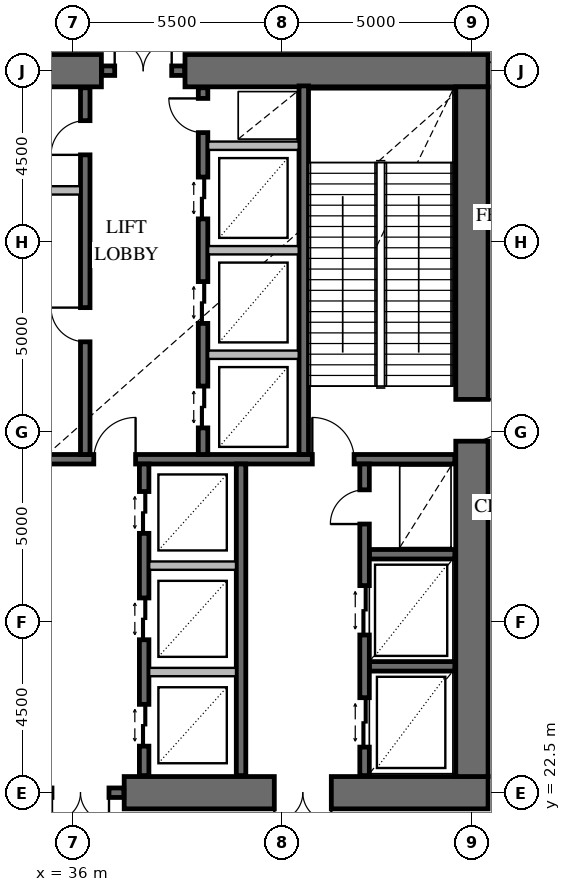
"""IFC4 building model, lengths in metres.
Left out: names, types, materials, properties, quantities, classifications, styles, units other than length and angle.
Written with IfcOpenShell. Run it as: python <this file> out.ifc"""

import sys

from ifc_helpers import new_model, si_unit, direction, frame, frame_2d, origin, place, context, subcontext, project, spatial, rectangle, extrude, element, fill, save


model = new_model("IFC4")
c1 = context("Model", 3, precision=1e-05, world=origin(), true_north=direction((0.0, 1.0)))
c2 = subcontext(c1, "Body", "Model", "MODEL_VIEW")
j1 = project(units=[si_unit("LENGTHUNIT", "METRE"), si_unit("PLANEANGLEUNIT", "RADIAN")], contexts=[c1])
p1 = place(None, origin())
s1 = spatial("IfcSite", under=j1, at=p1, CompositionType="ELEMENT")
p2 = place(p1, origin())
s2 = spatial("IfcBuilding", under=s1, at=p2, CompositionType="ELEMENT")
p3 = place(p2, origin())
s3 = spatial("IfcBuildingStorey", under=s2, at=p3, CompositionType="ELEMENT", Elevation=0.0)
p4 = place(p3, frame((37.35, 22.5, 0.0), z_axis=(0.0, 0.0, 1.0), x_axis=(1.0, 0.0, 0.0)))
e1 = element("IfcWall", 1, at=p4, inside=s3, PredefinedType="SHEAR", context=c2, shape_type="SweptSolid", body=[
    extrude(rectangle(XDim=9.575, YDim=0.85, at=frame_2d((4.788, 0.0))), origin(), (0.0, 0.0, 1.0), 7.8),
])
p5 = place(p4, frame((3.95, 0.0, 0.0)))
e2 = element("IfcOpeningElement", 2, at=p5, cuts=e1, PredefinedType="OPENING", context=c2, shape_type="SweptSolid", body=[
    extrude(rectangle(XDim=1.5, YDim=2.15, at=frame_2d((0.75, 1.075))), frame((0.0, 0.437, 0.0), z_axis=(0.0, -1.0, 0.0), x_axis=(1.0, 0.0, 0.0)), (0.0, 0.0, 1.0), 0.874),
])
p6 = place(p3, frame((46.925, 41.5, 0.0), z_axis=(0.0, 0.0, 1.0), x_axis=(-1.0, 0.0, 0.0)))
e3 = element("IfcWall", 3, at=p6, inside=s3, PredefinedType="SHEAR", context=c2, shape_type="SweptSolid", body=[
    extrude(rectangle(XDim=7.975, YDim=0.85, at=frame_2d((3.988, 0.0))), origin(), (0.0, 0.0, 1.0), 7.8),
])
p7 = place(p3, frame((36.75, 41.5, 0.0), z_axis=(0.0, 0.0, 1.0), x_axis=(-1.0, 0.0, 0.0)))
e4 = element("IfcWall", 4, at=p7, inside=s3, PredefinedType="SHEAR", context=c2, shape_type="SweptSolid", body=[
    extrude(rectangle(XDim=11.675, YDim=0.85, at=frame_2d((5.837, 0.0))), origin(), (0.0, 0.0, 1.0), 7.8),
])
p8 = place(p7, frame((4.25, 0.0, 0.0)))
e5 = element("IfcOpeningElement", 5, at=p8, cuts=e4, PredefinedType="OPENING", context=c2, shape_type="SweptSolid", body=[
    extrude(rectangle(XDim=1.1, YDim=2.15, at=frame_2d((0.55, 1.075))), frame((0.0, 0.437, 0.0), z_axis=(0.0, -1.0, 0.0), x_axis=(1.0, 0.0, 0.0)), (0.0, 0.0, 1.0), 0.874),
])
p9 = place(p3, frame((46.5, 22.925, 0.0), z_axis=(0.0, 0.0, 1.0), x_axis=(0.0, 1.0, 0.0)))
e6 = element("IfcWall", 6, at=p9, inside=s3, PredefinedType="SHEAR", context=c2, shape_type="SweptSolid", body=[
    extrude(rectangle(XDim=18.15, YDim=0.85, at=frame_2d((9.075, 0.0))), origin(), (0.0, 0.0, 1.0), 7.8),
])
p10 = place(p9, frame((8.825, 0.0, 0.0)))
e7 = element("IfcOpeningElement", 7, at=p10, cuts=e6, PredefinedType="OPENING", context=c2, shape_type="SweptSolid", body=[
    extrude(rectangle(XDim=1.1, YDim=2.15, at=frame_2d((0.55, 1.075))), frame((0.0, 0.437, 0.0), z_axis=(0.0, -1.0, 0.0), x_axis=(1.0, 0.0, 0.0)), (0.0, 0.0, 1.0), 0.874),
])
p11 = place(p3, frame((54.398, 30.911, 0.0), z_axis=(0.0, 0.0, 1.0), x_axis=(-0.49999847728, -0.866026282926, 0.0)))
e8 = element("IfcWall", 8, at=p11, inside=s3, PredefinedType="SOLIDWALL", context=c2, shape_type="SweptSolid", body=[
    extrude(rectangle(XDim=16.512, YDim=0.3, at=frame_2d((8.256, 0.0))), origin(), (0.0, 0.0, 1.0), 5.95),
])
p12 = place(p11, frame((7.356, 0.0, 0.0)))
e9 = element("IfcOpeningElement", 9, at=p12, cuts=e8, PredefinedType="OPENING", context=c2, shape_type="SweptSolid", body=[
    extrude(rectangle(XDim=1.8, YDim=2.4, at=frame_2d((0.9, 1.2))), frame((0.0, 0.162, 0.0), z_axis=(0.0, -1.0, 0.0), x_axis=(1.0, 0.0, 0.0)), (0.0, 0.0, 1.0), 0.324),
])
p13 = place(p11, frame((7.056, 0.0, 4.5)))
e10 = element("IfcOpeningElement", 10, at=p13, cuts=e8, PredefinedType="OPENING", context=c2, shape_type="SweptSolid", body=[
    extrude(rectangle(XDim=2.4, YDim=1.6, at=frame_2d((1.2, 0.8))), frame((0.0, 0.162, 0.0), z_axis=(0.0, -1.0, 0.0), x_axis=(1.0, 0.0, 0.0)), (0.0, 0.0, 1.0), 0.324),
])
p14 = place(p3, frame((46.142, 47.389, 0.0), z_axis=(0.0, 0.0, 1.0), x_axis=(0.49999847728, -0.866026282926, 0.0)))
e11 = element("IfcWall", 11, at=p14, inside=s3, PredefinedType="SOLIDWALL", context=c2, shape_type="SweptSolid", body=[
    extrude(rectangle(XDim=16.512, YDim=0.3, at=frame_2d((8.256, 0.0))), origin(), (0.0, 0.0, 1.0), 5.95),
])
p15 = place(p14, frame((8.606, 0.0, 0.0)))
e12 = element("IfcOpeningElement", 12, at=p15, cuts=e11, PredefinedType="OPENING", context=c2, shape_type="SweptSolid", body=[
    extrude(rectangle(XDim=2.0, YDim=2.5, at=frame_2d((1.0, 1.25))), frame((0.0, 0.162, 0.0), z_axis=(0.0, -1.0, 0.0), x_axis=(1.0, 0.0, 0.0)), (0.0, 0.0, 1.0), 0.324),
])
p16 = place(p14, frame((7.056, 0.0, 4.5)))
e13 = element("IfcOpeningElement", 13, at=p16, cuts=e11, PredefinedType="OPENING", context=c2, shape_type="SweptSolid", body=[
    extrude(rectangle(XDim=2.4, YDim=1.6, at=frame_2d((1.2, 0.8))), frame((0.0, 0.162, 0.0), z_axis=(0.0, -1.0, 0.0), x_axis=(1.0, 0.0, 0.0)), (0.0, 0.0, 1.0), 0.324),
])
p17 = place(p3, frame((35.06, 22.5, 0.0), z_axis=(0.0, 0.0, 1.0), x_axis=(1.0, 0.0, 0.0)))
e14 = element("IfcWall", 14, at=p17, inside=s3, PredefinedType="SOLIDWALL", context=c2, shape_type="SweptSolid", body=[
    extrude(rectangle(XDim=2.28, YDim=0.25, at=frame_2d((1.14, 0.0))), origin(), (0.0, 0.0, 1.0), 7.8),
])
p18 = place(p17, frame((0.39, 0.0, 0.0)))
e15 = element("IfcOpeningElement", 15, at=p18, cuts=e14, PredefinedType="OPENING", context=c2, shape_type="SweptSolid", body=[
    extrude(rectangle(XDim=1.5, YDim=2.15, at=frame_2d((0.75, 1.075))), frame((0.0, 0.137, 0.0), z_axis=(0.0, -1.0, 0.0), x_axis=(1.0, 0.0, 0.0)), (0.0, 0.0, 1.0), 0.274),
])
p19 = place(p3, frame((36.76, 41.5, 0.0), z_axis=(0.0, 0.0, 1.0), x_axis=(1.0, 0.0, 0.0)))
e16 = element("IfcWall", 16, at=p19, inside=s3, PredefinedType="SOLIDWALL", context=c2, shape_type="SweptSolid", body=[
    extrude(rectangle(XDim=2.18, YDim=0.25, at=frame_2d((1.09, 0.0))), origin(), (0.0, 0.0, 1.0), 7.8),
])
p20 = place(p19, frame((0.34, 0.0, 0.0)))
e17 = element("IfcOpeningElement", 17, at=p20, cuts=e16, PredefinedType="OPENING", context=c2, shape_type="SweptSolid", body=[
    extrude(rectangle(XDim=1.5, YDim=2.15, at=frame_2d((0.75, 1.075))), frame((0.0, 0.137, 0.0), z_axis=(0.0, -1.0, 0.0), x_axis=(1.0, 0.0, 0.0)), (0.0, 0.0, 1.0), 0.274),
])
p21 = place(p3, frame((25.95, 31.275, 0.0), z_axis=(0.0, 0.0, 1.0), x_axis=(1.0, 0.0, 0.0)))
e18 = element("IfcWall", 18, at=p21, inside=s3, PredefinedType="SOLIDWALL", context=c2, shape_type="SweptSolid", body=[
    extrude(rectangle(XDim=20.1, YDim=0.25, at=frame_2d((10.05, 0.0))), origin(), (0.0, 0.0, 1.0), 7.8),
])
p22 = place(p21, frame((2.6, 0.0, 0.0)))
e19 = element("IfcOpeningElement", 19, at=p22, cuts=e18, PredefinedType="OPENING", context=c2, shape_type="SweptSolid", body=[
    extrude(rectangle(XDim=1.1, YDim=2.15, at=frame_2d((0.55, 1.075))), frame((0.0, 0.137, 0.0), z_axis=(0.0, -1.0, 0.0), x_axis=(1.0, 0.0, 0.0)), (0.0, 0.0, 1.0), 0.274),
])
p23 = place(p21, frame((10.6, 0.0, 0.0)))
e20 = element("IfcOpeningElement", 20, at=p23, cuts=e18, PredefinedType="OPENING", context=c2, shape_type="SweptSolid", body=[
    extrude(rectangle(XDim=1.1, YDim=2.15, at=frame_2d((0.55, 1.075))), frame((0.0, 0.137, 0.0), z_axis=(0.0, -1.0, 0.0), x_axis=(1.0, 0.0, 0.0)), (0.0, 0.0, 1.0), 0.274),
])
p24 = place(p21, frame((16.35, 0.0, 0.0)))
e21 = element("IfcOpeningElement", 21, at=p24, cuts=e18, PredefinedType="OPENING", context=c2, shape_type="SweptSolid", body=[
    extrude(rectangle(XDim=1.1, YDim=2.15, at=frame_2d((0.55, 1.075))), frame((0.0, 0.137, 0.0), z_axis=(0.0, -1.0, 0.0), x_axis=(1.0, 0.0, 0.0)), (0.0, 0.0, 1.0), 0.274),
])
p25 = place(p3, frame((42.075, 31.4, 0.0), z_axis=(0.0, 0.0, 1.0), x_axis=(0.0, 1.0, 0.0)))
e22 = element("IfcWall", 22, at=p25, inside=s3, PredefinedType="SOLIDWALL", context=c2, shape_type="SweptSolid", body=[
    extrude(rectangle(XDim=9.7, YDim=0.25, at=frame_2d((4.85, 0.0))), origin(), (0.0, 0.0, 1.0), 7.8),
])
p26 = place(p3, frame((36.325, 31.4, 0.0), z_axis=(0.0, 0.0, 1.0), x_axis=(0.0, 1.0, 0.0)))
e23 = element("IfcWall", 23, at=p26, inside=s3, PredefinedType="SOLIDWALL", context=c2, shape_type="SweptSolid", body=[
    extrude(rectangle(XDim=9.65, YDim=0.25, at=frame_2d((4.825, 0.0))), origin(), (0.0, 0.0, 1.0), 7.8),
])
p27 = place(p26, frame((2.965, 0.0, 0.0)))
e24 = element("IfcOpeningElement", 24, at=p27, cuts=e23, PredefinedType="OPENING", context=c2, shape_type="SweptSolid", body=[
    extrude(rectangle(XDim=0.9, YDim=2.1, at=frame_2d((0.45, 1.05))), frame((0.0, 0.137, 0.0), z_axis=(0.0, -1.0, 0.0), x_axis=(1.0, 0.0, 0.0)), (0.0, 0.0, 1.0), 0.274),
])
p28 = place(p26, frame((7.885, 0.0, 0.0)))
e25 = element("IfcOpeningElement", 25, at=p28, cuts=e23, PredefinedType="OPENING", context=c2, shape_type="SweptSolid", body=[
    extrude(rectangle(XDim=0.9, YDim=2.1, at=frame_2d((0.45, 1.05))), frame((0.0, 0.137, 0.0), z_axis=(0.0, -1.0, 0.0), x_axis=(1.0, 0.0, 0.0)), (0.0, 0.0, 1.0), 0.274),
])
p29 = place(p3, frame((39.425, 31.4, 0.0), z_axis=(0.0, 0.0, 1.0), x_axis=(0.0, 1.0, 0.0)))
e26 = element("IfcWall", 26, at=p29, inside=s3, PredefinedType="SOLIDWALL", context=c2, shape_type="SweptSolid", body=[
    extrude(rectangle(XDim=9.65, YDim=0.25, at=frame_2d((4.825, 0.0))), origin(), (0.0, 0.0, 1.0), 7.8),
])
p30 = place(p29, frame((0.7, 0.0, 0.0)))
e27 = element("IfcOpeningElement", 27, at=p30, cuts=e26, PredefinedType="OPENING", context=c2, shape_type="SweptSolid", body=[
    extrude(rectangle(XDim=1.1, YDim=2.2, at=frame_2d((0.55, 1.1))), frame((0.0, 0.137, 0.0), z_axis=(0.0, -1.0, 0.0), x_axis=(1.0, 0.0, 0.0)), (0.0, 0.0, 1.0), 0.274),
])
p31 = place(p29, frame((3.45, 0.0, 0.0)))
e28 = element("IfcOpeningElement", 28, at=p31, cuts=e26, PredefinedType="OPENING", context=c2, shape_type="SweptSolid", body=[
    extrude(rectangle(XDim=1.1, YDim=2.2, at=frame_2d((0.55, 1.1))), frame((0.0, 0.137, 0.0), z_axis=(0.0, -1.0, 0.0), x_axis=(1.0, 0.0, 0.0)), (0.0, 0.0, 1.0), 0.274),
])
p32 = place(p29, frame((6.2, 0.0, 0.0)))
e29 = element("IfcOpeningElement", 29, at=p32, cuts=e26, PredefinedType="OPENING", context=c2, shape_type="SweptSolid", body=[
    extrude(rectangle(XDim=1.1, YDim=2.2, at=frame_2d((0.55, 1.1))), frame((0.0, 0.137, 0.0), z_axis=(0.0, -1.0, 0.0), x_axis=(1.0, 0.0, 0.0)), (0.0, 0.0, 1.0), 0.274),
])
p33 = place(p29, frame((8.47, 0.0, 0.0)))
e30 = element("IfcOpeningElement", 30, at=p33, cuts=e26, PredefinedType="OPENING", context=c2, shape_type="SweptSolid", body=[
    extrude(rectangle(XDim=0.9, YDim=2.1, at=frame_2d((0.45, 1.05))), frame((0.0, 0.137, 0.0), z_axis=(0.0, -1.0, 0.0), x_axis=(1.0, 0.0, 0.0)), (0.0, 0.0, 1.0), 0.274),
])
p34 = place(p3, frame((37.875, 22.95, 0.0), z_axis=(0.0, 0.0, 1.0), x_axis=(0.0, 1.0, 0.0)))
e31 = element("IfcWall", 31, at=p34, inside=s3, PredefinedType="SOLIDWALL", context=c2, shape_type="SweptSolid", body=[
    extrude(rectangle(XDim=8.2, YDim=0.25, at=frame_2d((4.1, 0.0))), origin(), (0.0, 0.0, 1.0), 7.8),
])
p35 = place(p34, frame((0.775, 0.0, 0.0)))
e32 = element("IfcOpeningElement", 32, at=p35, cuts=e31, PredefinedType="OPENING", context=c2, shape_type="SweptSolid", body=[
    extrude(rectangle(XDim=1.1, YDim=2.2, at=frame_2d((0.55, 1.1))), frame((0.0, 0.137, 0.0), z_axis=(0.0, -1.0, 0.0), x_axis=(1.0, 0.0, 0.0)), (0.0, 0.0, 1.0), 0.274),
])
p36 = place(p34, frame((3.575, 0.0, 0.0)))
e33 = element("IfcOpeningElement", 33, at=p36, cuts=e31, PredefinedType="OPENING", context=c2, shape_type="SweptSolid", body=[
    extrude(rectangle(XDim=1.1, YDim=2.2, at=frame_2d((0.55, 1.1))), frame((0.0, 0.137, 0.0), z_axis=(0.0, -1.0, 0.0), x_axis=(1.0, 0.0, 0.0)), (0.0, 0.0, 1.0), 0.274),
])
p37 = place(p34, frame((6.375, 0.0, 0.0)))
e34 = element("IfcOpeningElement", 34, at=p37, cuts=e31, PredefinedType="OPENING", context=c2, shape_type="SweptSolid", body=[
    extrude(rectangle(XDim=1.1, YDim=2.2, at=frame_2d((0.55, 1.1))), frame((0.0, 0.137, 0.0), z_axis=(0.0, -1.0, 0.0), x_axis=(1.0, 0.0, 0.0)), (0.0, 0.0, 1.0), 0.274),
])
p38 = place(p3, frame((40.425, 22.95, 0.0), z_axis=(0.0, 0.0, 1.0), x_axis=(0.0, 1.0, 0.0)))
e35 = element("IfcWall", 35, at=p38, inside=s3, PredefinedType="SOLIDWALL", context=c2, shape_type="SweptSolid", body=[
    extrude(rectangle(XDim=8.2, YDim=0.25, at=frame_2d((4.1, 0.0))), origin(), (0.0, 0.0, 1.0), 7.8),
])
for number, where, z_axis, x_axis in (
    (36, (43.8, 25.825, 0.0), (0.0, 0.0, 1.0), (1.0, 0.0, 0.0)),
    (37, (43.8, 28.775, 0.0), (0.0, 0.0, 1.0), (1.0, 0.0, 0.0)),
):
    element("IfcWall", number, at=place(p3, frame(where, z_axis=z_axis, x_axis=x_axis)), inside=s3, PredefinedType="SOLIDWALL", context=c2, shape_type="SweptSolid", body=[
        extrude(rectangle(XDim=2.25, YDim=0.25, at=frame_2d((1.125, 0.0))), origin(), (0.0, 0.0, 1.0), 7.8),
    ])
p39 = place(p3, frame((43.675, 22.95, 0.0), z_axis=(0.0, 0.0, 1.0), x_axis=(0.0, 1.0, 0.0)))
e38 = element("IfcWall", 38, at=p39, inside=s3, PredefinedType="SOLIDWALL", context=c2, shape_type="SweptSolid", body=[
    extrude(rectangle(XDim=8.2, YDim=0.25, at=frame_2d((4.1, 0.0))), origin(), (0.0, 0.0, 1.0), 7.8),
])
p40 = place(p39, frame((0.75, 0.0, 0.0)))
e39 = element("IfcOpeningElement", 39, at=p40, cuts=e38, PredefinedType="OPENING", context=c2, shape_type="SweptSolid", body=[
    extrude(rectangle(XDim=1.3, YDim=2.3, at=frame_2d((0.65, 1.15))), frame((0.0, 0.137, 0.0), z_axis=(0.0, -1.0, 0.0), x_axis=(1.0, 0.0, 0.0)), (0.0, 0.0, 1.0), 0.274),
])
p41 = place(p39, frame((3.7, 0.0, 0.0)))
e40 = element("IfcOpeningElement", 40, at=p41, cuts=e38, PredefinedType="OPENING", context=c2, shape_type="SweptSolid", body=[
    extrude(rectangle(XDim=1.3, YDim=2.3, at=frame_2d((0.65, 1.15))), frame((0.0, 0.137, 0.0), z_axis=(0.0, -1.0, 0.0), x_axis=(1.0, 0.0, 0.0)), (0.0, 0.0, 1.0), 0.274),
])
p42 = place(p39, frame((6.62, 0.0, 0.0)))
e41 = element("IfcOpeningElement", 41, at=p42, cuts=e38, PredefinedType="OPENING", context=c2, shape_type="SweptSolid", body=[
    extrude(rectangle(XDim=0.9, YDim=2.1, at=frame_2d((0.45, 1.05))), frame((0.0, 0.137, 0.0), z_axis=(0.0, -1.0, 0.0), x_axis=(1.0, 0.0, 0.0)), (0.0, 0.0, 1.0), 0.274),
])
p43 = place(p3, frame((34.108, 38.35, 0.0), z_axis=(0.0, 0.0, 1.0), x_axis=(1.0, 0.0, 0.0)))
e42 = element("IfcWall", 42, at=p43, inside=s3, PredefinedType="PARTITIONING", context=c2, shape_type="SweptSolid", body=[
    extrude(rectangle(XDim=2.084, YDim=0.22, at=frame_2d((1.042, 0.0))), origin(), (0.0, 0.0, 1.0), 7.35),
])
for number, where, z_axis, x_axis in (
    (43, (39.558, 34.025, 0.0), (0.0, 0.0, 1.0), (1.0, 0.0, 0.0)),
    (44, (39.558, 36.775, 0.0), (0.0, 0.0, 1.0), (1.0, 0.0, 0.0)),
    (45, (39.558, 39.525, 0.0), (0.0, 0.0, 1.0), (1.0, 0.0, 0.0)),
):
    element("IfcWall", number, at=place(p3, frame(where, z_axis=z_axis, x_axis=x_axis)), inside=s3, PredefinedType="PARTITIONING", context=c2, shape_type="SweptSolid", body=[
        extrude(rectangle(XDim=2.384, YDim=0.22, at=frame_2d((1.192, 0.0))), origin(), (0.0, 0.0, 1.0), 7.35),
    ])
for number, where, z_axis, x_axis in (
    (46, (38.008, 25.675, 0.0), (0.0, 0.0, 1.0), (1.0, 0.0, 0.0)),
    (47, (38.008, 28.475, 0.0), (0.0, 0.0, 1.0), (1.0, 0.0, 0.0)),
):
    element("IfcWall", number, at=place(p3, frame(where, z_axis=z_axis, x_axis=x_axis)), inside=s3, PredefinedType="PARTITIONING", context=c2, shape_type="SweptSolid", body=[
        extrude(rectangle(XDim=2.284, YDim=0.22, at=frame_2d((1.142, 0.0))), origin(), (0.0, 0.0, 1.0), 7.35),
    ])
p44 = place(p10, frame((1.1, 0.0, 0.0), z_axis=(0.0, 0.0, 1.0), x_axis=(-1.0, 0.0, 0.0)))
e48 = element("IfcDoor", 48, at=p44, inside=s3, OperationType="SINGLE_SWING_LEFT", PredefinedType="USERDEFINED", context=c2, shape_type="SweptSolid", body=[
    extrude(rectangle(XDim=1.1, YDim=2.15, at=frame_2d((0.55, 1.075))), frame((0.0, 0.025, 0.0), z_axis=(0.0, -1.0, 0.0), x_axis=(1.0, 0.0, 0.0)), (0.0, 0.0, 1.0), 0.05),
])
fill(e7, e48)
p45 = place(p5, frame((1.5, 0.0, 0.0), z_axis=(0.0, 0.0, 1.0), x_axis=(-1.0, 0.0, 0.0)))
e49 = element("IfcDoor", 49, at=p45, inside=s3, OperationType="DOUBLE_DOOR_SINGLE_SWING", PredefinedType="DOOR", context=c2, shape_type="SweptSolid", body=[
    extrude(rectangle(XDim=1.5, YDim=2.15, at=frame_2d((0.75, 1.075))), frame((0.0, 0.025, 0.0), z_axis=(0.0, -1.0, 0.0), x_axis=(1.0, 0.0, 0.0)), (0.0, 0.0, 1.0), 0.05),
])
fill(e2, e49)
p46 = place(p18, frame((1.5, 0.0, 0.0), z_axis=(0.0, 0.0, 1.0), x_axis=(-1.0, 0.0, 0.0)))
e50 = element("IfcDoor", 50, at=p46, inside=s3, OperationType="DOUBLE_DOOR_SINGLE_SWING", PredefinedType="DOOR", context=c2, shape_type="SweptSolid", body=[
    extrude(rectangle(XDim=1.5, YDim=2.15, at=frame_2d((0.75, 1.075))), frame((0.0, 0.025, 0.0), z_axis=(0.0, -1.0, 0.0), x_axis=(1.0, 0.0, 0.0)), (0.0, 0.0, 1.0), 0.05),
])
fill(e15, e50)
p47 = place(p20, origin())
e51 = element("IfcDoor", 51, at=p47, inside=s3, OperationType="DOUBLE_DOOR_SINGLE_SWING", PredefinedType="DOOR", context=c2, shape_type="SweptSolid", body=[
    extrude(rectangle(XDim=1.5, YDim=2.15, at=frame_2d((0.75, 1.075))), frame((0.0, 0.025, 0.0), z_axis=(0.0, -1.0, 0.0), x_axis=(1.0, 0.0, 0.0)), (0.0, 0.0, 1.0), 0.05),
])
fill(e17, e51)
p48 = place(p23, origin())
e52 = element("IfcDoor", 52, at=p48, inside=s3, OperationType="SINGLE_SWING_RIGHT", PredefinedType="USERDEFINED", context=c2, shape_type="SweptSolid", body=[
    extrude(rectangle(XDim=1.1, YDim=2.15, at=frame_2d((0.55, 1.075))), frame((0.0, 0.025, 0.0), z_axis=(0.0, -1.0, 0.0), x_axis=(1.0, 0.0, 0.0)), (0.0, 0.0, 1.0), 0.05),
])
fill(e20, e52)
p49 = place(p24, origin())
e53 = element("IfcDoor", 53, at=p49, inside=s3, OperationType="SINGLE_SWING_LEFT", PredefinedType="USERDEFINED", context=c2, shape_type="SweptSolid", body=[
    extrude(rectangle(XDim=1.1, YDim=2.15, at=frame_2d((0.55, 1.075))), frame((0.0, 0.025, 0.0), z_axis=(0.0, -1.0, 0.0), x_axis=(1.0, 0.0, 0.0)), (0.0, 0.0, 1.0), 0.05),
])
fill(e21, e53)
p50 = place(p27, origin())
e54 = element("IfcDoor", 54, at=p50, inside=s3, OperationType="SINGLE_SWING_RIGHT", PredefinedType="DOOR", context=c2, shape_type="SweptSolid", body=[
    extrude(rectangle(XDim=0.9, YDim=2.1, at=frame_2d((0.45, 1.05))), frame((0.0, 0.025, 0.0), z_axis=(0.0, -1.0, 0.0), x_axis=(1.0, 0.0, 0.0)), (0.0, 0.0, 1.0), 0.05),
])
fill(e24, e54)
p51 = place(p28, origin())
e55 = element("IfcDoor", 55, at=p51, inside=s3, OperationType="SINGLE_SWING_LEFT", PredefinedType="DOOR", context=c2, shape_type="SweptSolid", body=[
    extrude(rectangle(XDim=0.9, YDim=2.1, at=frame_2d((0.45, 1.05))), frame((0.0, 0.025, 0.0), z_axis=(0.0, -1.0, 0.0), x_axis=(1.0, 0.0, 0.0)), (0.0, 0.0, 1.0), 0.05),
])
fill(e25, e55)
p52 = place(p30, origin())
e56 = element("IfcDoor", 56, at=p52, inside=s3, OperationType="DOUBLE_DOOR_SLIDING", PredefinedType="DOOR", context=c2, shape_type="SweptSolid", body=[
    extrude(rectangle(XDim=1.1, YDim=2.2, at=frame_2d((0.55, 1.1))), frame((0.0, 0.025, 0.0), z_axis=(0.0, -1.0, 0.0), x_axis=(1.0, 0.0, 0.0)), (0.0, 0.0, 1.0), 0.05),
])
fill(e27, e56)
p53 = place(p31, origin())
e57 = element("IfcDoor", 57, at=p53, inside=s3, OperationType="DOUBLE_DOOR_SLIDING", PredefinedType="DOOR", context=c2, shape_type="SweptSolid", body=[
    extrude(rectangle(XDim=1.1, YDim=2.2, at=frame_2d((0.55, 1.1))), frame((0.0, 0.025, 0.0), z_axis=(0.0, -1.0, 0.0), x_axis=(1.0, 0.0, 0.0)), (0.0, 0.0, 1.0), 0.05),
])
fill(e28, e57)
p54 = place(p32, origin())
e58 = element("IfcDoor", 58, at=p54, inside=s3, OperationType="DOUBLE_DOOR_SLIDING", PredefinedType="DOOR", context=c2, shape_type="SweptSolid", body=[
    extrude(rectangle(XDim=1.1, YDim=2.2, at=frame_2d((0.55, 1.1))), frame((0.0, 0.025, 0.0), z_axis=(0.0, -1.0, 0.0), x_axis=(1.0, 0.0, 0.0)), (0.0, 0.0, 1.0), 0.05),
])
fill(e29, e58)
p55 = place(p33, origin())
e59 = element("IfcDoor", 59, at=p55, inside=s3, OperationType="SINGLE_SWING_RIGHT", PredefinedType="DOOR", context=c2, shape_type="SweptSolid", body=[
    extrude(rectangle(XDim=0.9, YDim=2.1, at=frame_2d((0.45, 1.05))), frame((0.0, 0.025, 0.0), z_axis=(0.0, -1.0, 0.0), x_axis=(1.0, 0.0, 0.0)), (0.0, 0.0, 1.0), 0.05),
])
fill(e30, e59)
p56 = place(p35, origin())
e60 = element("IfcDoor", 60, at=p56, inside=s3, OperationType="DOUBLE_DOOR_SLIDING", PredefinedType="DOOR", context=c2, shape_type="SweptSolid", body=[
    extrude(rectangle(XDim=1.1, YDim=2.2, at=frame_2d((0.55, 1.1))), frame((0.0, 0.025, 0.0), z_axis=(0.0, -1.0, 0.0), x_axis=(1.0, 0.0, 0.0)), (0.0, 0.0, 1.0), 0.05),
])
fill(e32, e60)
p57 = place(p36, origin())
e61 = element("IfcDoor", 61, at=p57, inside=s3, OperationType="DOUBLE_DOOR_SLIDING", PredefinedType="DOOR", context=c2, shape_type="SweptSolid", body=[
    extrude(rectangle(XDim=1.1, YDim=2.2, at=frame_2d((0.55, 1.1))), frame((0.0, 0.025, 0.0), z_axis=(0.0, -1.0, 0.0), x_axis=(1.0, 0.0, 0.0)), (0.0, 0.0, 1.0), 0.05),
])
fill(e33, e61)
p58 = place(p37, origin())
e62 = element("IfcDoor", 62, at=p58, inside=s3, OperationType="DOUBLE_DOOR_SLIDING", PredefinedType="DOOR", context=c2, shape_type="SweptSolid", body=[
    extrude(rectangle(XDim=1.1, YDim=2.2, at=frame_2d((0.55, 1.1))), frame((0.0, 0.025, 0.0), z_axis=(0.0, -1.0, 0.0), x_axis=(1.0, 0.0, 0.0)), (0.0, 0.0, 1.0), 0.05),
])
fill(e34, e62)
p59 = place(p40, origin())
e63 = element("IfcDoor", 63, at=p59, inside=s3, OperationType="DOUBLE_DOOR_SLIDING", PredefinedType="DOOR", context=c2, shape_type="SweptSolid", body=[
    extrude(rectangle(XDim=1.3, YDim=2.3, at=frame_2d((0.65, 1.15))), frame((0.0, 0.025, 0.0), z_axis=(0.0, -1.0, 0.0), x_axis=(1.0, 0.0, 0.0)), (0.0, 0.0, 1.0), 0.05),
])
fill(e39, e63)
p60 = place(p41, origin())
e64 = element("IfcDoor", 64, at=p60, inside=s3, OperationType="DOUBLE_DOOR_SLIDING", PredefinedType="DOOR", context=c2, shape_type="SweptSolid", body=[
    extrude(rectangle(XDim=1.3, YDim=2.3, at=frame_2d((0.65, 1.15))), frame((0.0, 0.025, 0.0), z_axis=(0.0, -1.0, 0.0), x_axis=(1.0, 0.0, 0.0)), (0.0, 0.0, 1.0), 0.05),
])
fill(e40, e64)
p61 = place(p42, origin())
e65 = element("IfcDoor", 65, at=p61, inside=s3, OperationType="SINGLE_SWING_LEFT", PredefinedType="DOOR", context=c2, shape_type="SweptSolid", body=[
    extrude(rectangle(XDim=0.9, YDim=2.1, at=frame_2d((0.45, 1.05))), frame((0.0, 0.025, 0.0), z_axis=(0.0, -1.0, 0.0), x_axis=(1.0, 0.0, 0.0)), (0.0, 0.0, 1.0), 0.05),
])
fill(e41, e65)
save(model, sys.argv[1])
